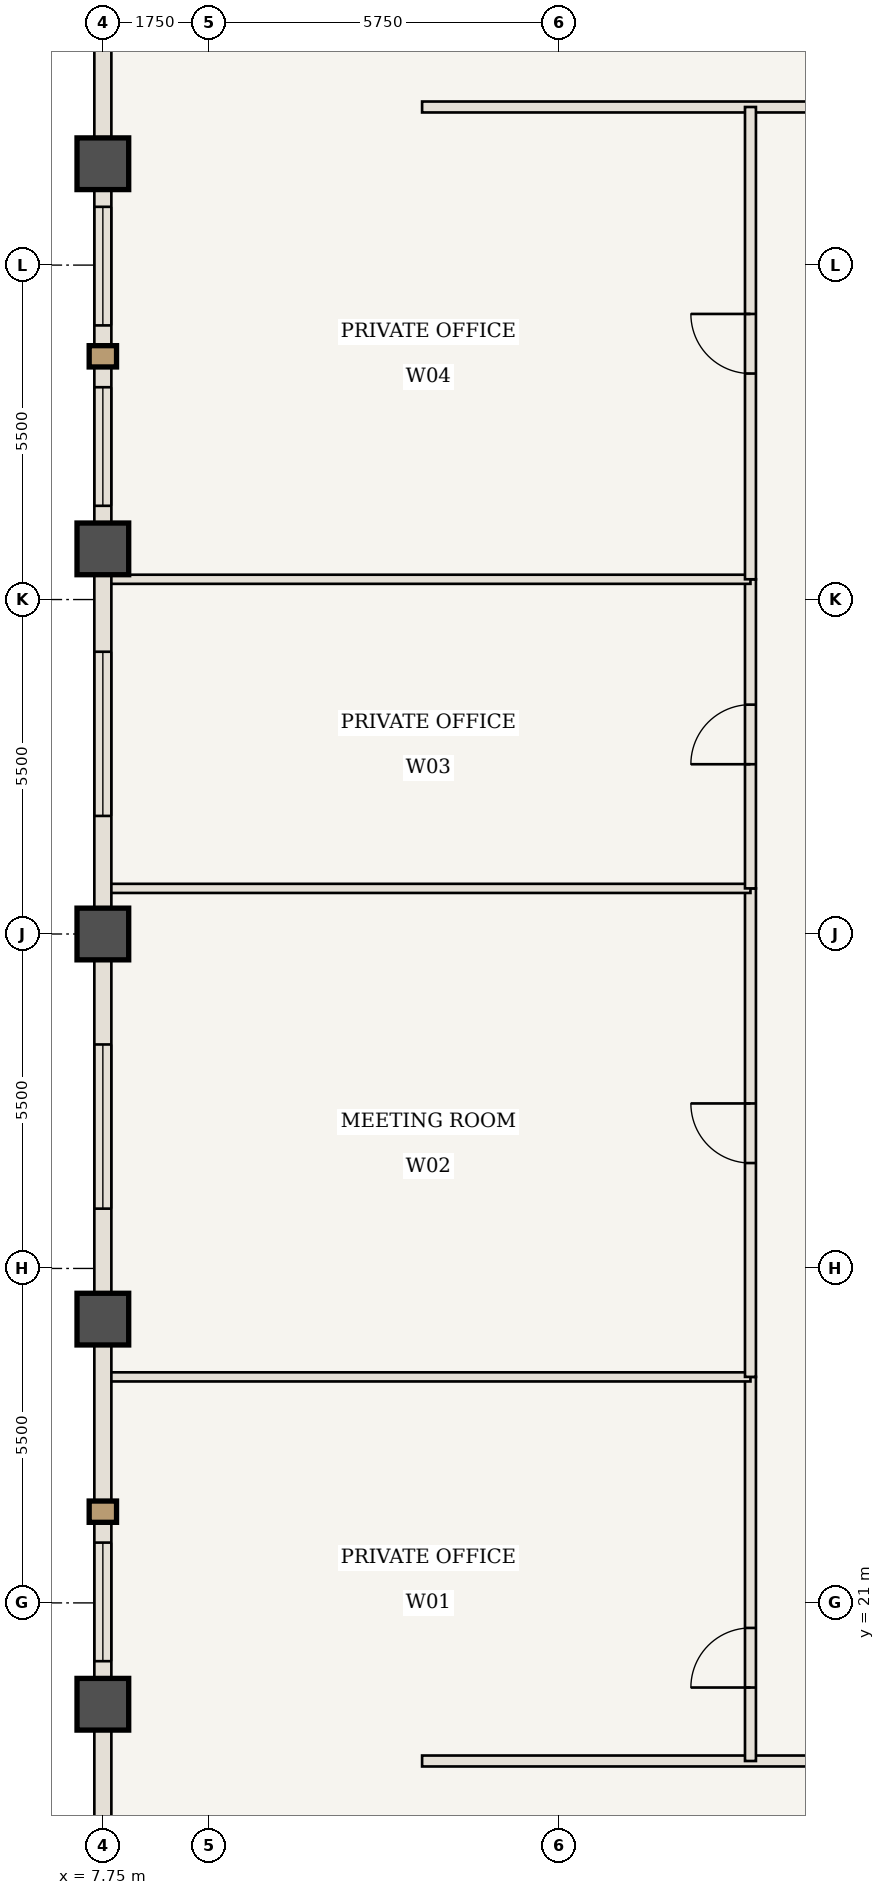
"""IFC4 building model, lengths in metres.
Left out: names, types, materials, properties, quantities, classifications, styles, units other than length and angle.
Written with IfcOpenShell. Run it as: python <this file> out.ifc"""

import sys

from ifc_helpers import new_model, si_unit, direction, frame, frame_2d, origin, origin_2d, place, context, subcontext, project, spatial, rectangle, extrude, element, fill, save


model = new_model("IFC4")
c1 = context("Model", 3, precision=1e-05, world=origin(), true_north=direction((0.0, 1.0)))
c2 = subcontext(c1, "Body", "Model", "MODEL_VIEW")
j1 = project(units=[si_unit("LENGTHUNIT", "METRE"), si_unit("PLANEANGLEUNIT", "RADIAN")], contexts=[c1])
p1 = place(None, origin())
s1 = spatial("IfcSite", under=j1, at=p1, CompositionType="ELEMENT")
p2 = place(p1, origin())
s2 = spatial("IfcBuilding", under=s1, at=p2, CompositionType="ELEMENT")
p3 = place(p2, frame((0.0, 0.0, 194.6)))
s3 = spatial("IfcBuildingStorey", under=s2, at=p3, CompositionType="ELEMENT", Elevation=194.6)
for number, where, z_axis, x_axis in (
    (1, (7.75, 19.333, 0.0), (0.0, 0.0, 1.0), (1.0, 0.0, 0.0)),
    (2, (7.75, 25.667, 0.0), (0.0, 0.0, 1.0), (1.0, 0.0, 0.0)),
    (3, (7.75, 32.0, 0.0), (0.0, 0.0, 1.0), (1.0, 0.0, 0.0)),
    (4, (7.75, 38.333, 0.0), (0.0, 0.0, 1.0), (1.0, 0.0, 0.0)),
    (5, (7.75, 44.667, 0.0), (0.0, 0.0, 1.0), (1.0, 0.0, 0.0)),
):
    element("IfcColumn", number, at=place(p3, frame(where, z_axis=z_axis, x_axis=x_axis)), inside=s3, PredefinedType="COLUMN", context=c2, shape_type="SweptSolid", body=[
        extrude(rectangle(XDim=0.85, YDim=0.85, at=origin_2d()), origin(), (0.0, 0.0, 1.0), 3.85),
    ])
p4 = place(p3, frame((13.0, 18.4, 0.0), z_axis=(0.0, 0.0, 1.0), x_axis=(1.0, 0.0, 0.0)))
e6 = element("IfcWall", 6, at=p4, inside=s3, PredefinedType="STANDARD", context=c2, shape_type="SweptSolid", body=[
    extrude(rectangle(XDim=38.0, YDim=0.18, at=frame_2d((19.0, 0.0))), origin(), (0.0, 0.0, 1.0), 3.685),
])
p5 = place(p4, frame((19.925, 0.0, 0.0)))
e7 = element("IfcOpeningElement", 7, at=p5, cuts=e6, PredefinedType="OPENING", context=c2, shape_type="SweptSolid", body=[
    extrude(rectangle(XDim=0.98, YDim=2.2, at=frame_2d((0.49, 1.1))), frame((0.0, 0.1, 0.0), z_axis=(0.0, -1.0, 0.0), x_axis=(1.0, 0.0, 0.0)), (0.0, 0.0, 1.0), 0.2),
])
p6 = place(p3, frame((13.0, 45.6, 0.0), z_axis=(0.0, 0.0, 1.0), x_axis=(1.0, 0.0, 0.0)))
e8 = element("IfcWall", 8, at=p6, inside=s3, PredefinedType="STANDARD", context=c2, shape_type="SweptSolid", body=[
    extrude(rectangle(XDim=11.717, YDim=0.18, at=frame_2d((5.858, 0.0))), origin(), (0.0, 0.0, 1.0), 3.685),
])
p7 = place(p6, frame((6.608, 0.0, 0.0)))
e9 = element("IfcOpeningElement", 9, at=p7, cuts=e8, PredefinedType="OPENING", context=c2, shape_type="SweptSolid", body=[
    extrude(rectangle(XDim=0.98, YDim=2.2, at=frame_2d((0.49, 1.1))), frame((0.0, 0.1, 0.0), z_axis=(0.0, -1.0, 0.0), x_axis=(1.0, 0.0, 0.0)), (0.0, 0.0, 1.0), 0.2),
])
p8 = place(p3, frame((18.4, 18.4, 0.0), z_axis=(0.0, 0.0, 1.0), x_axis=(0.0, 1.0, 0.0)))
e10 = element("IfcWall", 10, at=p8, inside=s3, PredefinedType="STANDARD", context=c2, shape_type="SweptSolid", body=[
    extrude(rectangle(XDim=6.317, YDim=0.18, at=frame_2d((3.158, 0.0))), origin(), (0.0, 0.0, 1.0), 3.685),
])
p9 = place(p8, frame((1.208, 0.0, 0.0)))
e11 = element("IfcOpeningElement", 11, at=p9, cuts=e10, PredefinedType="OPENING", context=c2, shape_type="SweptSolid", body=[
    extrude(rectangle(XDim=0.98, YDim=2.2, at=frame_2d((0.49, 1.1))), frame((0.0, 0.1, 0.0), z_axis=(0.0, -1.0, 0.0), x_axis=(1.0, 0.0, 0.0)), (0.0, 0.0, 1.0), 0.2),
])
p10 = place(p3, frame((7.81, 24.717, 0.0), z_axis=(0.0, 0.0, 1.0), x_axis=(1.0, 0.0, 0.0)))
e12 = element("IfcWall", 12, at=p10, inside=s3, PredefinedType="STANDARD", context=c2, shape_type="SweptSolid", body=[
    extrude(rectangle(XDim=10.59, YDim=0.15, at=frame_2d((5.295, 0.0))), origin(), (0.0, 0.0, 1.0), 3.685),
])
p11 = place(p3, frame((18.4, 24.717, 0.0), z_axis=(0.0, 0.0, 1.0), x_axis=(0.0, 1.0, 0.0)))
e13 = element("IfcWall", 13, at=p11, inside=s3, PredefinedType="STANDARD", context=c2, shape_type="SweptSolid", body=[
    extrude(rectangle(XDim=8.033, YDim=0.18, at=frame_2d((4.017, 0.0))), origin(), (0.0, 0.0, 1.0), 3.685),
])
p12 = place(p11, frame((3.517, 0.0, 0.0)))
e14 = element("IfcOpeningElement", 14, at=p12, cuts=e13, PredefinedType="OPENING", context=c2, shape_type="SweptSolid", body=[
    extrude(rectangle(XDim=0.98, YDim=2.2, at=frame_2d((0.49, 1.1))), frame((0.0, 0.1, 0.0), z_axis=(0.0, -1.0, 0.0), x_axis=(1.0, 0.0, 0.0)), (0.0, 0.0, 1.0), 0.2),
])
p13 = place(p3, frame((7.81, 32.75, 0.0), z_axis=(0.0, 0.0, 1.0), x_axis=(1.0, 0.0, 0.0)))
e15 = element("IfcWall", 15, at=p13, inside=s3, PredefinedType="STANDARD", context=c2, shape_type="SweptSolid", body=[
    extrude(rectangle(XDim=10.59, YDim=0.15, at=frame_2d((5.295, 0.0))), origin(), (0.0, 0.0, 1.0), 3.685),
])
p14 = place(p3, frame((18.4, 32.75, 0.0), z_axis=(0.0, 0.0, 1.0), x_axis=(0.0, 1.0, 0.0)))
e16 = element("IfcWall", 16, at=p14, inside=s3, PredefinedType="STANDARD", context=c2, shape_type="SweptSolid", body=[
    extrude(rectangle(XDim=5.083, YDim=0.18, at=frame_2d((2.542, 0.0))), origin(), (0.0, 0.0, 1.0), 3.685),
])
p15 = place(p14, frame((2.042, 0.0, 0.0)))
e17 = element("IfcOpeningElement", 17, at=p15, cuts=e16, PredefinedType="OPENING", context=c2, shape_type="SweptSolid", body=[
    extrude(rectangle(XDim=0.98, YDim=2.2, at=frame_2d((0.49, 1.1))), frame((0.0, 0.1, 0.0), z_axis=(0.0, -1.0, 0.0), x_axis=(1.0, 0.0, 0.0)), (0.0, 0.0, 1.0), 0.2),
])
p16 = place(p3, frame((7.81, 37.833, 0.0), z_axis=(0.0, 0.0, 1.0), x_axis=(1.0, 0.0, 0.0)))
e18 = element("IfcWall", 18, at=p16, inside=s3, PredefinedType="STANDARD", context=c2, shape_type="SweptSolid", body=[
    extrude(rectangle(XDim=10.59, YDim=0.15, at=frame_2d((5.295, 0.0))), origin(), (0.0, 0.0, 1.0), 3.685),
])
p17 = place(p3, frame((18.4, 37.833, 0.0), z_axis=(0.0, 0.0, 1.0), x_axis=(0.0, 1.0, 0.0)))
e19 = element("IfcWall", 19, at=p17, inside=s3, PredefinedType="STANDARD", context=c2, shape_type="SweptSolid", body=[
    extrude(rectangle(XDim=7.767, YDim=0.18, at=frame_2d((3.883, 0.0))), origin(), (0.0, 0.0, 1.0), 3.685),
])
p18 = place(p17, frame((3.383, 0.0, 0.0)))
e20 = element("IfcOpeningElement", 20, at=p18, cuts=e19, PredefinedType="OPENING", context=c2, shape_type="SweptSolid", body=[
    extrude(rectangle(XDim=0.98, YDim=2.2, at=frame_2d((0.49, 1.1))), frame((0.0, 0.1, 0.0), z_axis=(0.0, -1.0, 0.0), x_axis=(1.0, 0.0, 0.0)), (0.0, 0.0, 1.0), 0.2),
])
p19 = place(p3, frame((7.75, 13.0, 0.0), z_axis=(0.0, 0.0, 1.0), x_axis=(0.0, 1.0, 0.0)))
e21 = element("IfcWall", 21, at=p19, inside=s3, PredefinedType="USERDEFINED", context=c2, shape_type="SweptSolid", body=[
    extrude(rectangle(XDim=6.333, YDim=0.28, at=frame_2d((3.167, 0.0))), origin(), (0.0, 0.0, 1.0), 2.985),
])
p20 = place(p3, frame((7.75, 19.333, 0.0), z_axis=(0.0, 0.0, 1.0), x_axis=(0.0, 1.0, 0.0)))
e22 = element("IfcWall", 22, at=p20, inside=s3, PredefinedType="USERDEFINED", context=c2, shape_type="SweptSolid", body=[
    extrude(rectangle(XDim=6.333, YDim=0.28, at=frame_2d((3.167, 0.0))), origin(), (0.0, 0.0, 1.0), 2.985),
])
p21 = place(p20, frame((0.708, 0.0, 0.85)))
e23 = element("IfcOpeningElement", 23, at=p21, cuts=e22, PredefinedType="OPENING", context=c2, shape_type="SweptSolid", body=[
    extrude(rectangle(XDim=1.95, YDim=1.935, at=frame_2d((0.975, 0.968))), frame((0.0, 0.15, 0.0), z_axis=(0.0, -1.0, 0.0), x_axis=(1.0, 0.0, 0.0)), (0.0, 0.0, 1.0), 0.3),
])
p22 = place(p3, frame((7.75, 25.667, 0.0), z_axis=(0.0, 0.0, 1.0), x_axis=(0.0, 1.0, 0.0)))
e24 = element("IfcWall", 24, at=p22, inside=s3, PredefinedType="USERDEFINED", context=c2, shape_type="SweptSolid", body=[
    extrude(rectangle(XDim=6.333, YDim=0.28, at=frame_2d((3.167, 0.0))), origin(), (0.0, 0.0, 1.0), 2.985),
])
p23 = place(p22, frame((1.817, 0.0, 0.85)))
e25 = element("IfcOpeningElement", 25, at=p23, cuts=e24, PredefinedType="OPENING", context=c2, shape_type="SweptSolid", body=[
    extrude(rectangle(XDim=2.7, YDim=1.935, at=frame_2d((1.35, 0.968))), frame((0.0, 0.15, 0.0), z_axis=(0.0, -1.0, 0.0), x_axis=(1.0, 0.0, 0.0)), (0.0, 0.0, 1.0), 0.3),
])
p24 = place(p3, frame((7.75, 32.0, 0.0), z_axis=(0.0, 0.0, 1.0), x_axis=(0.0, 1.0, 0.0)))
e26 = element("IfcWall", 26, at=p24, inside=s3, PredefinedType="USERDEFINED", context=c2, shape_type="SweptSolid", body=[
    extrude(rectangle(XDim=6.333, YDim=0.28, at=frame_2d((3.167, 0.0))), origin(), (0.0, 0.0, 1.0), 2.985),
])
p25 = place(p24, frame((1.942, 0.0, 0.85)))
e27 = element("IfcOpeningElement", 27, at=p25, cuts=e26, PredefinedType="OPENING", context=c2, shape_type="SweptSolid", body=[
    extrude(rectangle(XDim=2.7, YDim=1.935, at=frame_2d((1.35, 0.968))), frame((0.0, 0.15, 0.0), z_axis=(0.0, -1.0, 0.0), x_axis=(1.0, 0.0, 0.0)), (0.0, 0.0, 1.0), 0.3),
])
p26 = place(p3, frame((7.75, 38.333, 0.0), z_axis=(0.0, 0.0, 1.0), x_axis=(0.0, 1.0, 0.0)))
e28 = element("IfcWall", 28, at=p26, inside=s3, PredefinedType="USERDEFINED", context=c2, shape_type="SweptSolid", body=[
    extrude(rectangle(XDim=6.333, YDim=0.28, at=frame_2d((3.167, 0.0))), origin(), (0.0, 0.0, 1.0), 2.985),
])
p27 = place(p26, frame((0.708, 0.0, 0.85)))
e29 = element("IfcOpeningElement", 29, at=p27, cuts=e28, PredefinedType="OPENING", context=c2, shape_type="SweptSolid", body=[
    extrude(rectangle(XDim=1.95, YDim=1.935, at=frame_2d((0.975, 0.968))), frame((0.0, 0.15, 0.0), z_axis=(0.0, -1.0, 0.0), x_axis=(1.0, 0.0, 0.0)), (0.0, 0.0, 1.0), 0.3),
])
p28 = place(p26, frame((3.675, 0.0, 0.85)))
e30 = element("IfcOpeningElement", 30, at=p28, cuts=e28, PredefinedType="OPENING", context=c2, shape_type="SweptSolid", body=[
    extrude(rectangle(XDim=1.95, YDim=1.935, at=frame_2d((0.975, 0.968))), frame((0.0, 0.15, 0.0), z_axis=(0.0, -1.0, 0.0), x_axis=(1.0, 0.0, 0.0)), (0.0, 0.0, 1.0), 0.3),
])
p29 = place(p3, frame((7.75, 44.667, 0.0), z_axis=(0.0, 0.0, 1.0), x_axis=(0.0, 1.0, 0.0)))
e31 = element("IfcWall", 31, at=p29, inside=s3, PredefinedType="USERDEFINED", context=c2, shape_type="SweptSolid", body=[
    extrude(rectangle(XDim=6.333, YDim=0.28, at=frame_2d((3.167, 0.0))), origin(), (0.0, 0.0, 1.0), 2.985),
])
p30 = place(p9, origin())
e32 = element("IfcDoor", 32, at=p30, inside=s3, OperationType="SINGLE_SWING_LEFT", PredefinedType="DOOR", context=c2, shape_type="SweptSolid", body=[
    extrude(rectangle(XDim=0.98, YDim=2.2, at=frame_2d((0.49, 1.1))), frame((0.0, 0.025, 0.0), z_axis=(0.0, -1.0, 0.0), x_axis=(1.0, 0.0, 0.0)), (0.0, 0.0, 1.0), 0.05),
])
fill(e11, e32)
p31 = place(p12, origin())
e33 = element("IfcDoor", 33, at=p31, inside=s3, OperationType="SINGLE_SWING_RIGHT", PredefinedType="DOOR", context=c2, shape_type="SweptSolid", body=[
    extrude(rectangle(XDim=0.98, YDim=2.2, at=frame_2d((0.49, 1.1))), frame((0.0, 0.025, 0.0), z_axis=(0.0, -1.0, 0.0), x_axis=(1.0, 0.0, 0.0)), (0.0, 0.0, 1.0), 0.05),
])
fill(e14, e33)
p32 = place(p15, origin())
e34 = element("IfcDoor", 34, at=p32, inside=s3, OperationType="SINGLE_SWING_LEFT", PredefinedType="DOOR", context=c2, shape_type="SweptSolid", body=[
    extrude(rectangle(XDim=0.98, YDim=2.2, at=frame_2d((0.49, 1.1))), frame((0.0, 0.025, 0.0), z_axis=(0.0, -1.0, 0.0), x_axis=(1.0, 0.0, 0.0)), (0.0, 0.0, 1.0), 0.05),
])
fill(e17, e34)
p33 = place(p18, origin())
e35 = element("IfcDoor", 35, at=p33, inside=s3, OperationType="SINGLE_SWING_RIGHT", PredefinedType="DOOR", context=c2, shape_type="SweptSolid", body=[
    extrude(rectangle(XDim=0.98, YDim=2.2, at=frame_2d((0.49, 1.1))), frame((0.0, 0.025, 0.0), z_axis=(0.0, -1.0, 0.0), x_axis=(1.0, 0.0, 0.0)), (0.0, 0.0, 1.0), 0.05),
])
fill(e20, e35)
p34 = place(p21, origin())
e36 = element("IfcWindow", 36, at=p34, inside=s3, PartitioningType="SINGLE_PANEL", PredefinedType="WINDOW", context=c2, shape_type="SweptSolid", body=[
    extrude(rectangle(XDim=1.95, YDim=1.935, at=frame_2d((0.975, 0.968))), frame((0.0, 0.03, 0.0), z_axis=(0.0, -1.0, 0.0), x_axis=(1.0, 0.0, 0.0)), (0.0, 0.0, 1.0), 0.06),
])
fill(e23, e36)
p35 = place(p23, origin())
e37 = element("IfcWindow", 37, at=p35, inside=s3, PartitioningType="SINGLE_PANEL", PredefinedType="WINDOW", context=c2, shape_type="SweptSolid", body=[
    extrude(rectangle(XDim=2.7, YDim=1.935, at=frame_2d((1.35, 0.968))), frame((0.0, 0.03, 0.0), z_axis=(0.0, -1.0, 0.0), x_axis=(1.0, 0.0, 0.0)), (0.0, 0.0, 1.0), 0.06),
])
fill(e25, e37)
p36 = place(p25, origin())
e38 = element("IfcWindow", 38, at=p36, inside=s3, PartitioningType="SINGLE_PANEL", PredefinedType="WINDOW", context=c2, shape_type="SweptSolid", body=[
    extrude(rectangle(XDim=2.7, YDim=1.935, at=frame_2d((1.35, 0.968))), frame((0.0, 0.03, 0.0), z_axis=(0.0, -1.0, 0.0), x_axis=(1.0, 0.0, 0.0)), (0.0, 0.0, 1.0), 0.06),
])
fill(e27, e38)
p37 = place(p27, origin())
e39 = element("IfcWindow", 39, at=p37, inside=s3, PartitioningType="SINGLE_PANEL", PredefinedType="WINDOW", context=c2, shape_type="SweptSolid", body=[
    extrude(rectangle(XDim=1.95, YDim=1.935, at=frame_2d((0.975, 0.968))), frame((0.0, 0.03, 0.0), z_axis=(0.0, -1.0, 0.0), x_axis=(1.0, 0.0, 0.0)), (0.0, 0.0, 1.0), 0.06),
])
fill(e29, e39)
p38 = place(p28, origin())
e40 = element("IfcWindow", 40, at=p38, inside=s3, PartitioningType="SINGLE_PANEL", PredefinedType="WINDOW", context=c2, shape_type="SweptSolid", body=[
    extrude(rectangle(XDim=1.95, YDim=1.935, at=frame_2d((0.975, 0.968))), frame((0.0, 0.03, 0.0), z_axis=(0.0, -1.0, 0.0), x_axis=(1.0, 0.0, 0.0)), (0.0, 0.0, 1.0), 0.06),
])
fill(e30, e40)
save(model, sys.argv[1])
